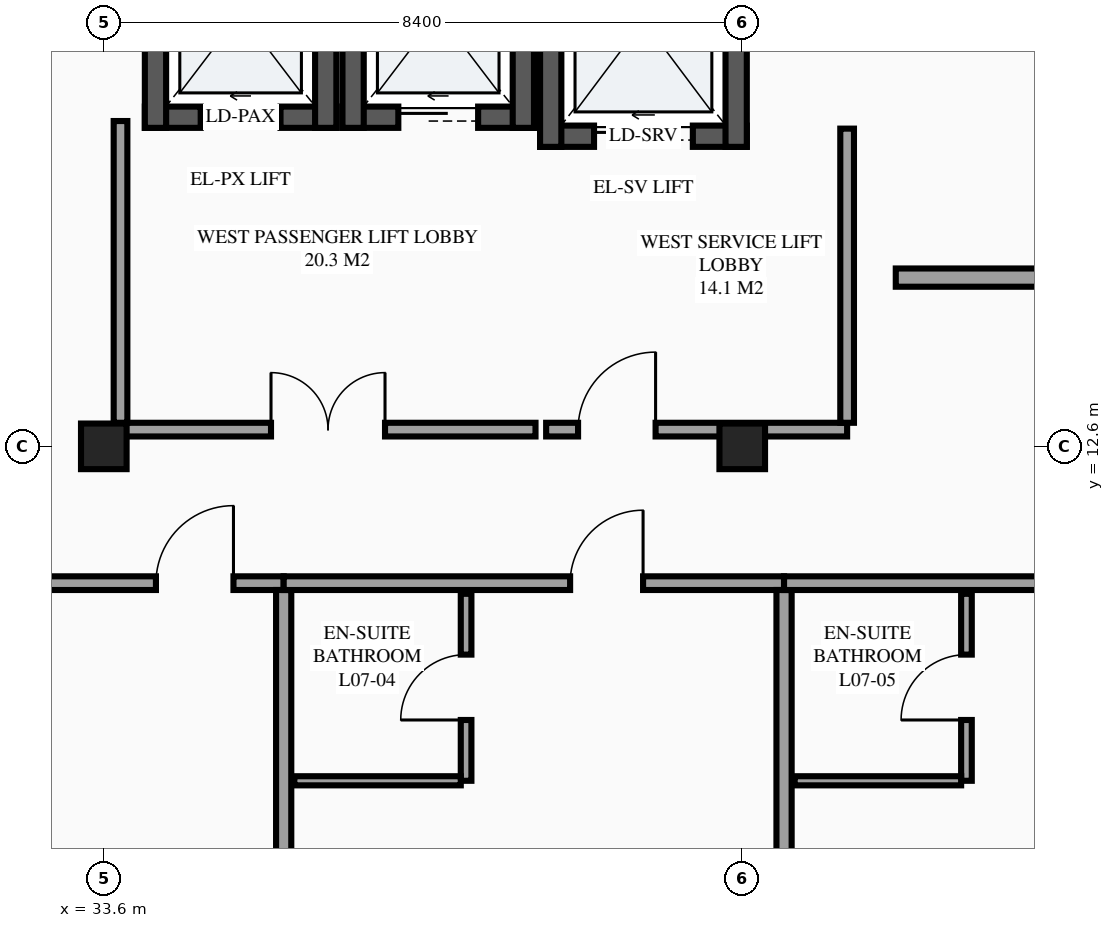
"""IFC4 building model, lengths in metres.
Left out: names, types, materials, properties, quantities, classifications, styles, units other than length and angle.
Written with IfcOpenShell. Run it as: python <this file> out.ifc"""

import sys

from ifc_helpers import new_model, si_unit, direction, frame, frame_2d, origin, origin_2d, place, context, subcontext, project, spatial, rectangle, extrude, element, fill, save


model = new_model("IFC4")
c1 = context("Model", 3, precision=1e-05, world=origin(), true_north=direction((0.0, 1.0)))
c2 = subcontext(c1, "Body", "Model", "MODEL_VIEW")
j1 = project(units=[si_unit("LENGTHUNIT", "METRE"), si_unit("PLANEANGLEUNIT", "RADIAN")], contexts=[c1])
p1 = place(None, origin())
s1 = spatial("IfcSite", under=j1, at=p1, CompositionType="ELEMENT")
p2 = place(p1, origin())
s2 = spatial("IfcBuilding", under=s1, at=p2, CompositionType="ELEMENT")
p3 = place(p2, frame((0.0, 0.0, 29.1)))
s3 = spatial("IfcBuildingStorey", under=s2, at=p3, CompositionType="ELEMENT", Elevation=29.1)
for number, where, z_axis, x_axis in (
    (1, (33.6, 12.6, 0.0), (0.0, 0.0, 1.0), (1.0, 0.0, 0.0)),
    (2, (42.0, 12.6, 0.0), (0.0, 0.0, 1.0), (1.0, 0.0, 0.0)),
):
    element("IfcColumn", number, at=place(p3, frame(where, z_axis=z_axis, x_axis=x_axis)), inside=s3, PredefinedType="COLUMN", context=c2, shape_type="SweptSolid", body=[
        extrude(rectangle(XDim=0.6, YDim=0.6, at=origin_2d()), origin(), (0.0, 0.0, 1.0), 3.6),
    ])
p4 = place(p3, frame((34.14, 16.93, 0.0), z_axis=(0.0, 0.0, 1.0), x_axis=(1.0, 0.0, 0.0)))
e3 = element("IfcWall", 3, at=p4, inside=s3, PredefinedType="SHEAR", context=c2, shape_type="SweptSolid", body=[
    extrude(rectangle(XDim=2.52, YDim=0.28, at=frame_2d((1.26, 0.0))), origin(), (0.0, 0.0, 1.0), 3.6),
])
p5 = place(p4, frame((0.735, 0.0, 0.0)))
e4 = element("IfcOpeningElement", 4, at=p5, cuts=e3, PredefinedType="OPENING", context=c2, shape_type="SweptSolid", body=[
    extrude(rectangle(XDim=1.05, YDim=2.2, at=frame_2d((0.525, 1.1))), frame((0.0, 0.15, 0.0), z_axis=(0.0, -1.0, 0.0), x_axis=(1.0, 0.0, 0.0)), (0.0, 0.0, 1.0), 0.3),
])
for number, where, z_axis, x_axis in (
    (5, (36.52, 16.79, 0.0), (0.0, 0.0, 1.0), (0.0, 1.0, 0.0)),
    (6, (34.28, 19.81, 0.0), (0.0, 0.0, 1.0), (0.0, -1.0, 0.0)),
):
    element("IfcWall", number, at=place(p3, frame(where, z_axis=z_axis, x_axis=x_axis)), inside=s3, PredefinedType="SHEAR", context=c2, shape_type="SweptSolid", body=[
        extrude(rectangle(XDim=3.02, YDim=0.28, at=frame_2d((1.51, 0.0))), origin(), (0.0, 0.0, 1.0), 3.6),
    ])
p6 = place(p3, frame((36.74, 16.93, 0.0), z_axis=(0.0, 0.0, 1.0), x_axis=(1.0, 0.0, 0.0)))
e7 = element("IfcWall", 7, at=p6, inside=s3, PredefinedType="SHEAR", context=c2, shape_type="SweptSolid", body=[
    extrude(rectangle(XDim=2.52, YDim=0.28, at=frame_2d((1.26, 0.0))), origin(), (0.0, 0.0, 1.0), 3.6),
])
p7 = place(p6, frame((0.735, 0.0, 0.0)))
e8 = element("IfcOpeningElement", 8, at=p7, cuts=e7, PredefinedType="OPENING", context=c2, shape_type="SweptSolid", body=[
    extrude(rectangle(XDim=1.05, YDim=2.2, at=frame_2d((0.525, 1.1))), frame((0.0, 0.15, 0.0), z_axis=(0.0, -1.0, 0.0), x_axis=(1.0, 0.0, 0.0)), (0.0, 0.0, 1.0), 0.3),
])
for number, where, z_axis, x_axis in (
    (9, (39.12, 16.79, 0.0), (0.0, 0.0, 1.0), (0.0, 1.0, 0.0)),
    (10, (36.88, 19.81, 0.0), (0.0, 0.0, 1.0), (0.0, -1.0, 0.0)),
):
    element("IfcWall", number, at=place(p3, frame(where, z_axis=z_axis, x_axis=x_axis)), inside=s3, PredefinedType="SHEAR", context=c2, shape_type="SweptSolid", body=[
        extrude(rectangle(XDim=3.02, YDim=0.28, at=frame_2d((1.51, 0.0))), origin(), (0.0, 0.0, 1.0), 3.6),
    ])
p8 = place(p3, frame((39.34, 16.68, 0.0), z_axis=(0.0, 0.0, 1.0), x_axis=(1.0, 0.0, 0.0)))
e11 = element("IfcWall", 11, at=p8, inside=s3, PredefinedType="SHEAR", context=c2, shape_type="SweptSolid", body=[
    extrude(rectangle(XDim=2.72, YDim=0.28, at=frame_2d((1.36, 0.0))), origin(), (0.0, 0.0, 1.0), 3.6),
])
p9 = place(p8, frame((0.71, 0.0, 0.0)))
e12 = element("IfcOpeningElement", 12, at=p9, cuts=e11, PredefinedType="OPENING", context=c2, shape_type="SweptSolid", body=[
    extrude(rectangle(XDim=1.3, YDim=2.25, at=frame_2d((0.65, 1.125))), frame((0.0, 0.15, 0.0), z_axis=(0.0, -1.0, 0.0), x_axis=(1.0, 0.0, 0.0)), (0.0, 0.0, 1.0), 0.3),
])
for number, where, z_axis, x_axis in (
    (13, (41.92, 16.54, 0.0), (0.0, 0.0, 1.0), (0.0, 1.0, 0.0)),
    (14, (39.48, 19.86, 0.0), (0.0, 0.0, 1.0), (0.0, -1.0, 0.0)),
):
    element("IfcWall", number, at=place(p3, frame(where, z_axis=z_axis, x_axis=x_axis)), inside=s3, PredefinedType="SHEAR", context=c2, shape_type="SweptSolid", body=[
        extrude(rectangle(XDim=3.32, YDim=0.28, at=frame_2d((1.66, 0.0))), origin(), (0.0, 0.0, 1.0), 3.6),
    ])
p10 = place(p3, frame((29.383, 10.8, 0.0), z_axis=(0.0, 0.0, 1.0), x_axis=(1.0, 0.0, 0.0)))
e15 = element("IfcWall", 15, at=p10, inside=s3, PredefinedType="PARTITIONING", context=c2, shape_type="SweptSolid", body=[
    extrude(rectangle(XDim=6.583, YDim=0.18, at=frame_2d((3.292, 0.0))), origin(), (0.0, 0.0, 1.0), 3.375),
])
p11 = place(p10, frame((4.903, 0.0, 0.0)))
e16 = element("IfcOpeningElement", 16, at=p11, cuts=e15, PredefinedType="OPENING", context=c2, shape_type="SweptSolid", body=[
    extrude(rectangle(XDim=1.02, YDim=2.15, at=frame_2d((0.51, 1.075))), frame((0.0, 0.1, 0.0), z_axis=(0.0, -1.0, 0.0), x_axis=(1.0, 0.0, 0.0)), (0.0, 0.0, 1.0), 0.2),
])
p12 = place(p3, frame((35.967, 4.37, 0.0), z_axis=(0.0, 0.0, 1.0), x_axis=(0.0, 1.0, 0.0)))
e17 = element("IfcWall", 17, at=p12, inside=s3, PredefinedType="PARTITIONING", context=c2, shape_type="SweptSolid", body=[
    extrude(rectangle(XDim=6.34, YDim=0.2, at=frame_2d((3.17, 0.0))), origin(), (0.0, 0.0, 1.0), 3.375),
])
p13 = place(p3, frame((35.967, 10.8, 0.0), z_axis=(0.0, 0.0, 1.0), x_axis=(1.0, 0.0, 0.0)))
e18 = element("IfcWall", 18, at=p13, inside=s3, PredefinedType="PARTITIONING", context=c2, shape_type="SweptSolid", body=[
    extrude(rectangle(XDim=6.583, YDim=0.18, at=frame_2d((3.292, 0.0))), origin(), (0.0, 0.0, 1.0), 3.375),
])
p14 = place(p13, frame((3.769, 0.0, 0.0)))
e19 = element("IfcOpeningElement", 19, at=p14, cuts=e18, PredefinedType="OPENING", context=c2, shape_type="SweptSolid", body=[
    extrude(rectangle(XDim=0.96, YDim=2.15, at=frame_2d((0.48, 1.075))), frame((0.0, 0.1, 0.0), z_axis=(0.0, -1.0, 0.0), x_axis=(1.0, 0.0, 0.0)), (0.0, 0.0, 1.0), 0.2),
])
p15 = place(p3, frame((42.55, 4.37, 0.0), z_axis=(0.0, 0.0, 1.0), x_axis=(0.0, 1.0, 0.0)))
e20 = element("IfcWall", 20, at=p15, inside=s3, PredefinedType="PARTITIONING", context=c2, shape_type="SweptSolid", body=[
    extrude(rectangle(XDim=6.34, YDim=0.2, at=frame_2d((3.17, 0.0))), origin(), (0.0, 0.0, 1.0), 3.375),
])
p16 = place(p3, frame((38.367, 8.2, 0.0), z_axis=(0.0, 0.0, 1.0), x_axis=(0.0, 1.0, 0.0)))
e21 = element("IfcWall", 21, at=p16, inside=s3, PredefinedType="PARTITIONING", context=c2, shape_type="SweptSolid", body=[
    extrude(rectangle(XDim=2.46, YDim=0.14, at=frame_2d((1.23, 0.0))), origin(), (0.0, 0.0, 1.0), 3.375),
])
p17 = place(p16, frame((0.8, 0.0, 0.0)))
e22 = element("IfcOpeningElement", 22, at=p17, cuts=e21, PredefinedType="OPENING", context=c2, shape_type="SweptSolid", body=[
    extrude(rectangle(XDim=0.86, YDim=2.1, at=frame_2d((0.43, 1.05))), frame((0.0, 0.08, 0.0), z_axis=(0.0, -1.0, 0.0), x_axis=(1.0, 0.0, 0.0)), (0.0, 0.0, 1.0), 0.16),
])
p18 = place(p3, frame((36.107, 8.2, 0.0), z_axis=(0.0, 0.0, 1.0), x_axis=(1.0, 0.0, 0.0)))
e23 = element("IfcWall", 23, at=p18, inside=s3, PredefinedType="PARTITIONING", context=c2, shape_type="SweptSolid", body=[
    extrude(rectangle(XDim=2.19, YDim=0.12, at=frame_2d((1.095, 0.0))), origin(), (0.0, 0.0, 1.0), 3.375),
])
p19 = place(p3, frame((42.55, 10.8, 0.0), z_axis=(0.0, 0.0, 1.0), x_axis=(1.0, 0.0, 0.0)))
e24 = element("IfcWall", 24, at=p19, inside=s3, PredefinedType="PARTITIONING", context=c2, shape_type="SweptSolid", body=[
    extrude(rectangle(XDim=6.583, YDim=0.18, at=frame_2d((3.292, 0.0))), origin(), (0.0, 0.0, 1.0), 3.375),
])
p20 = place(p19, frame((4.469, 0.0, 0.0)))
e25 = element("IfcOpeningElement", 25, at=p20, cuts=e24, PredefinedType="OPENING", context=c2, shape_type="SweptSolid", body=[
    extrude(rectangle(XDim=0.96, YDim=2.15, at=frame_2d((0.48, 1.075))), frame((0.0, 0.1, 0.0), z_axis=(0.0, -1.0, 0.0), x_axis=(1.0, 0.0, 0.0)), (0.0, 0.0, 1.0), 0.2),
])
p21 = place(p3, frame((44.95, 8.2, 0.0), z_axis=(0.0, 0.0, 1.0), x_axis=(0.0, 1.0, 0.0)))
e26 = element("IfcWall", 26, at=p21, inside=s3, PredefinedType="PARTITIONING", context=c2, shape_type="SweptSolid", body=[
    extrude(rectangle(XDim=2.46, YDim=0.14, at=frame_2d((1.23, 0.0))), origin(), (0.0, 0.0, 1.0), 3.375),
])
p22 = place(p21, frame((0.8, 0.0, 0.0)))
e27 = element("IfcOpeningElement", 27, at=p22, cuts=e26, PredefinedType="OPENING", context=c2, shape_type="SweptSolid", body=[
    extrude(rectangle(XDim=0.86, YDim=2.1, at=frame_2d((0.43, 1.05))), frame((0.0, 0.08, 0.0), z_axis=(0.0, -1.0, 0.0), x_axis=(1.0, 0.0, 0.0)), (0.0, 0.0, 1.0), 0.16),
])
p23 = place(p3, frame((42.69, 8.2, 0.0), z_axis=(0.0, 0.0, 1.0), x_axis=(1.0, 0.0, 0.0)))
e28 = element("IfcWall", 28, at=p23, inside=s3, PredefinedType="PARTITIONING", context=c2, shape_type="SweptSolid", body=[
    extrude(rectangle(XDim=2.19, YDim=0.12, at=frame_2d((1.095, 0.0))), origin(), (0.0, 0.0, 1.0), 3.375),
])
p24 = place(p3, frame((33.82, 12.82, 0.0), z_axis=(0.0, 0.0, 1.0), x_axis=(1.0, 0.0, 0.0)))
e29 = element("IfcWall", 29, at=p24, inside=s3, PredefinedType="PARTITIONING", context=c2, shape_type="SweptSolid", body=[
    extrude(rectangle(XDim=5.46, YDim=0.18, at=frame_2d((2.73, 0.0))), origin(), (0.0, 0.0, 1.0), 2.43),
])
p25 = place(p24, frame((1.98, 0.0, 0.0)))
e30 = element("IfcOpeningElement", 30, at=p25, cuts=e29, PredefinedType="OPENING", context=c2, shape_type="SweptSolid", body=[
    extrude(rectangle(XDim=1.5, YDim=2.15, at=frame_2d((0.75, 1.075))), frame((0.0, 0.1, 0.0), z_axis=(0.0, -1.0, 0.0), x_axis=(1.0, 0.0, 0.0)), (0.0, 0.0, 1.0), 0.2),
])
p26 = place(p3, frame((33.82, 12.91, 0.0), z_axis=(0.0, 0.0, 1.0), x_axis=(0.0, 1.0, 0.0)))
e31 = element("IfcWall", 31, at=p26, inside=s3, PredefinedType="PARTITIONING", context=c2, shape_type="SweptSolid", body=[
    extrude(rectangle(XDim=3.97, YDim=0.18, at=frame_2d((1.985, 0.0))), origin(), (0.0, 0.0, 1.0), 3.375),
])
p27 = place(p3, frame((39.42, 12.82, 0.0), z_axis=(0.0, 0.0, 1.0), x_axis=(1.0, 0.0, 0.0)))
e32 = element("IfcWall", 32, at=p27, inside=s3, PredefinedType="PARTITIONING", context=c2, shape_type="SweptSolid", body=[
    extrude(rectangle(XDim=3.96, YDim=0.18, at=frame_2d((1.98, 0.0))), origin(), (0.0, 0.0, 1.0), 2.43),
])
p28 = place(p27, frame((0.42, 0.0, 0.0)))
e33 = element("IfcOpeningElement", 33, at=p28, cuts=e32, PredefinedType="OPENING", context=c2, shape_type="SweptSolid", body=[
    extrude(rectangle(XDim=1.02, YDim=2.15, at=frame_2d((0.51, 1.075))), frame((0.0, 0.1, 0.0), z_axis=(0.0, -1.0, 0.0), x_axis=(1.0, 0.0, 0.0)), (0.0, 0.0, 1.0), 0.2),
])
p29 = place(p3, frame((43.38, 12.91, 0.0), z_axis=(0.0, 0.0, 1.0), x_axis=(0.0, 1.0, 0.0)))
e34 = element("IfcWall", 34, at=p29, inside=s3, PredefinedType="PARTITIONING", context=c2, shape_type="SweptSolid", body=[
    extrude(rectangle(XDim=3.87, YDim=0.18, at=frame_2d((1.935, 0.0))), origin(), (0.0, 0.0, 1.0), 3.375),
])
p30 = place(p3, frame((44.02, 14.82, 0.0), z_axis=(0.0, 0.0, 1.0), x_axis=(1.0, 0.0, 0.0)))
e35 = element("IfcWall", 35, at=p30, inside=s3, PredefinedType="PARTITIONING", context=c2, shape_type="SweptSolid", body=[
    extrude(rectangle(XDim=5.96, YDim=0.24, at=frame_2d((2.98, 0.0))), origin(), (0.0, 0.0, 1.0), 3.375),
])
p31 = place(p30, frame((2.13, 0.0, 0.0)))
e36 = element("IfcOpeningElement", 36, at=p31, cuts=e35, PredefinedType="OPENING", context=c2, shape_type="SweptSolid", body=[
    extrude(rectangle(XDim=1.7, YDim=2.2, at=frame_2d((0.85, 1.1))), frame((0.0, 0.13, 0.0), z_axis=(0.0, -1.0, 0.0), x_axis=(1.0, 0.0, 0.0)), (0.0, 0.0, 1.0), 0.26),
])
p32 = place(p5, origin())
e37 = element("IfcDoor", 37, at=p32, inside=s3, OperationType="SLIDING_TO_LEFT", PredefinedType="DOOR", context=c2, shape_type="SweptSolid", body=[
    extrude(rectangle(XDim=1.05, YDim=2.2, at=frame_2d((0.525, 1.1))), frame((0.0, 0.025, 0.0), z_axis=(0.0, -1.0, 0.0), x_axis=(1.0, 0.0, 0.0)), (0.0, 0.0, 1.0), 0.05),
])
fill(e4, e37)
p33 = place(p7, origin())
e38 = element("IfcDoor", 38, at=p33, inside=s3, OperationType="SLIDING_TO_LEFT", PredefinedType="DOOR", context=c2, shape_type="SweptSolid", body=[
    extrude(rectangle(XDim=1.05, YDim=2.2, at=frame_2d((0.525, 1.1))), frame((0.0, 0.025, 0.0), z_axis=(0.0, -1.0, 0.0), x_axis=(1.0, 0.0, 0.0)), (0.0, 0.0, 1.0), 0.05),
])
fill(e8, e38)
p34 = place(p9, origin())
e39 = element("IfcDoor", 39, at=p34, inside=s3, OperationType="SLIDING_TO_LEFT", PredefinedType="DOOR", context=c2, shape_type="SweptSolid", body=[
    extrude(rectangle(XDim=1.3, YDim=2.25, at=frame_2d((0.65, 1.125))), frame((0.0, 0.025, 0.0), z_axis=(0.0, -1.0, 0.0), x_axis=(1.0, 0.0, 0.0)), (0.0, 0.0, 1.0), 0.05),
])
fill(e12, e39)
p35 = place(p11, origin())
e40 = element("IfcDoor", 40, at=p35, inside=s3, OperationType="SINGLE_SWING_RIGHT", PredefinedType="DOOR", context=c2, shape_type="SweptSolid", body=[
    extrude(rectangle(XDim=1.02, YDim=2.15, at=frame_2d((0.51, 1.075))), frame((0.0, 0.025, 0.0), z_axis=(0.0, -1.0, 0.0), x_axis=(1.0, 0.0, 0.0)), (0.0, 0.0, 1.0), 0.05),
])
fill(e16, e40)
p36 = place(p14, origin())
e41 = element("IfcDoor", 41, at=p36, inside=s3, OperationType="SINGLE_SWING_RIGHT", PredefinedType="DOOR", context=c2, shape_type="SweptSolid", body=[
    extrude(rectangle(XDim=0.96, YDim=2.15, at=frame_2d((0.48, 1.075))), frame((0.0, 0.025, 0.0), z_axis=(0.0, -1.0, 0.0), x_axis=(1.0, 0.0, 0.0)), (0.0, 0.0, 1.0), 0.05),
])
fill(e19, e41)
p37 = place(p17, origin())
e42 = element("IfcDoor", 42, at=p37, inside=s3, OperationType="SINGLE_SWING_LEFT", PredefinedType="DOOR", context=c2, shape_type="SweptSolid", body=[
    extrude(rectangle(XDim=0.86, YDim=2.1, at=frame_2d((0.43, 1.05))), frame((0.0, 0.025, 0.0), z_axis=(0.0, -1.0, 0.0), x_axis=(1.0, 0.0, 0.0)), (0.0, 0.0, 1.0), 0.05),
])
fill(e22, e42)
p38 = place(p22, origin())
e43 = element("IfcDoor", 43, at=p38, inside=s3, OperationType="SINGLE_SWING_LEFT", PredefinedType="DOOR", context=c2, shape_type="SweptSolid", body=[
    extrude(rectangle(XDim=0.86, YDim=2.1, at=frame_2d((0.43, 1.05))), frame((0.0, 0.025, 0.0), z_axis=(0.0, -1.0, 0.0), x_axis=(1.0, 0.0, 0.0)), (0.0, 0.0, 1.0), 0.05),
])
fill(e27, e43)
p39 = place(p25, origin())
e44 = element("IfcDoor", 44, at=p39, inside=s3, OperationType="DOUBLE_DOOR_SINGLE_SWING", PredefinedType="DOOR", context=c2, shape_type="SweptSolid", body=[
    extrude(rectangle(XDim=1.5, YDim=2.15, at=frame_2d((0.75, 1.075))), frame((0.0, 0.025, 0.0), z_axis=(0.0, -1.0, 0.0), x_axis=(1.0, 0.0, 0.0)), (0.0, 0.0, 1.0), 0.05),
])
fill(e30, e44)
p40 = place(p28, origin())
e45 = element("IfcDoor", 45, at=p40, inside=s3, OperationType="SINGLE_SWING_RIGHT", PredefinedType="DOOR", context=c2, shape_type="SweptSolid", body=[
    extrude(rectangle(XDim=1.02, YDim=2.15, at=frame_2d((0.51, 1.075))), frame((0.0, 0.025, 0.0), z_axis=(0.0, -1.0, 0.0), x_axis=(1.0, 0.0, 0.0)), (0.0, 0.0, 1.0), 0.05),
])
fill(e33, e45)
save(model, sys.argv[1])
